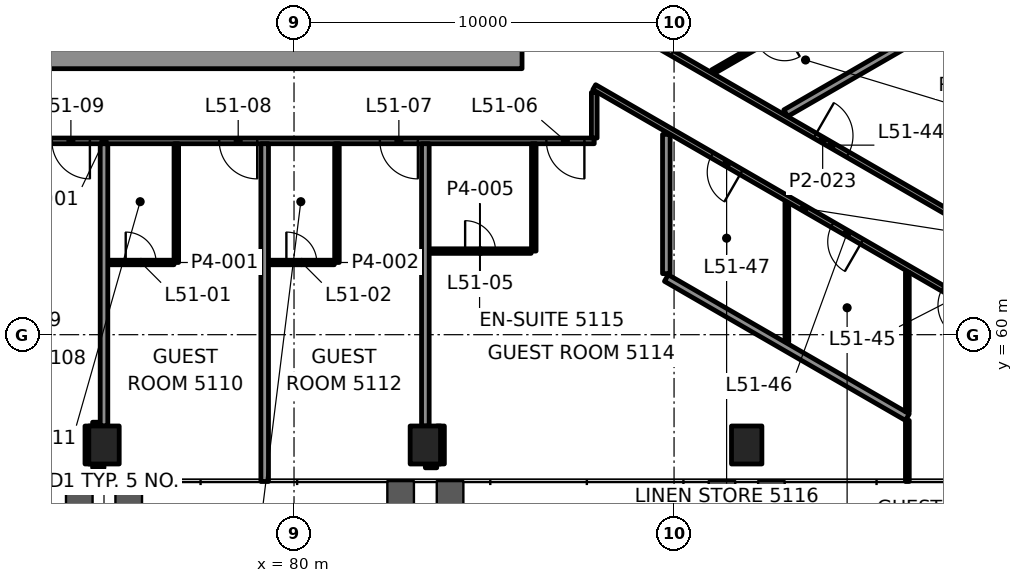
"""IFC4 building model, lengths in metres.
Left out: names, types, materials, properties, quantities, classifications, styles, units other than length and angle.
Written with IfcOpenShell. Run it as: python <this file> out.ifc"""

import sys

from ifc_helpers import new_model, si_unit, direction, frame, frame_2d, origin, origin_2d, place, context, subcontext, project, spatial, rectangle, hollow_rectangle, extrude, element, fill, save


model = new_model("IFC4")
c1 = context("Model", 3, precision=1e-05, world=origin(), true_north=direction((0.0, 1.0)))
c2 = subcontext(c1, "Body", "Model", "MODEL_VIEW")
j1 = project(units=[si_unit("LENGTHUNIT", "METRE"), si_unit("PLANEANGLEUNIT", "RADIAN")], contexts=[c1])
p1 = place(None, origin())
s1 = spatial("IfcSite", under=j1, at=p1, CompositionType="ELEMENT")
p2 = place(p1, origin())
s2 = spatial("IfcBuilding", under=s1, at=p2, CompositionType="ELEMENT")
p3 = place(p2, frame((0.0, 0.0, 218.2)))
s3 = spatial("IfcBuildingStorey", under=s2, at=p3, CompositionType="ELEMENT", Elevation=218.2)
for number, where, z_axis, x_axis in (
    (1, (75.0, 57.097, -0.0), (0.0, 0.0, 1.0), (1.0, 0.0, 0.0)),
    (2, (83.456, 57.097, -0.0), (0.0, 0.0, 1.0), (1.0, 0.0, 0.0)),
    (3, (91.911, 57.097, -0.0), (0.0, 0.0, 1.0), (1.0, 0.0, 0.0)),
):
    element("IfcColumn", number, at=place(p3, frame(where, z_axis=z_axis, x_axis=x_axis)), inside=s3, PredefinedType="COLUMN", context=c2, shape_type="SweptSolid", body=[
        extrude(hollow_rectangle(XDim=0.8, YDim=1.0, WallThickness=0.05, at=origin_2d()), origin(), (0.0, 0.0, 1.0), 3.9),
    ])
p4 = place(p3, frame((64.0, 67.375, 0.0), z_axis=(0.0, 0.0, 1.0), x_axis=(1.0, 0.0, 0.0)))
e4 = element("IfcWall", 4, at=p4, inside=s3, PredefinedType="SHEAR", context=c2, shape_type="SweptSolid", body=[
    extrude(rectangle(XDim=22.0, YDim=0.75, at=frame_2d((11.0, 0.0))), origin(), (0.0, 0.0, 1.0), 3.7),
])
p5 = place(p4, frame((3.15, 0.0, 0.0)))
e5 = element("IfcOpeningElement", 5, at=p5, cuts=e4, PredefinedType="OPENING", context=c2, shape_type="SweptSolid", body=[
    extrude(rectangle(XDim=0.9, YDim=2.1, at=frame_2d((0.45, 1.05))), frame((0.0, 0.385, 0.0), z_axis=(0.0, -1.0, 0.0), x_axis=(1.0, 0.0, 0.0)), (0.0, 0.0, 1.0), 0.77),
])
p6 = place(p3, frame((74.7, 56.597, 0.0), z_axis=(0.0, 0.0, 1.0), x_axis=(1.0, 0.0, 0.0)))
e6 = element("IfcWall", 6, at=p6, inside=s3, PredefinedType="PARTITIONING", context=c2, shape_type="SweptSolid", body=[
    extrude(rectangle(XDim=0.299, YDim=0.2, at=frame_2d((0.149, 0.0))), origin(), (0.0, 0.0, 1.0), 3.1),
])
p7 = place(p3, frame((83.456, 56.597, 0.0), z_axis=(0.0, 0.0, 1.0), x_axis=(1.0, 0.0, 0.0)))
e7 = element("IfcWall", 7, at=p7, inside=s3, PredefinedType="PARTITIONING", context=c2, shape_type="SweptSolid", body=[
    extrude(rectangle(XDim=0.3, YDim=0.2, at=frame_2d((0.15, 0.0))), origin(), (0.0, 0.0, 1.0), 3.1),
])
p8 = place(p3, frame((74.7, 57.597, 0.0), z_axis=(0.0, 0.0, 1.0), x_axis=(1.0, 0.0, 0.0)))
e8 = element("IfcWall", 8, at=p8, inside=s3, PredefinedType="PARTITIONING", context=c2, shape_type="SweptSolid", body=[
    extrude(rectangle(XDim=0.199, YDim=0.2, at=frame_2d((0.1, 0.0))), origin(), (0.0, 0.0, 1.0), 3.1),
])
p9 = place(p3, frame((75.1, 61.9, 0.0), z_axis=(0.0, 0.0, 1.0), x_axis=(1.0, 0.0, 0.0)))
e9 = element("IfcWall", 9, at=p9, inside=s3, PredefinedType="PARTITIONING", context=c2, shape_type="SweptSolid", body=[
    extrude(rectangle(XDim=1.742, YDim=0.12, at=frame_2d((0.871, 0.0))), origin(), (0.0, 0.0, 1.0), 3.1),
])
p10 = place(p9, frame((0.471, 0.0, 0.0)))
e10 = element("IfcOpeningElement", 10, at=p10, cuts=e9, PredefinedType="OPENING", context=c2, shape_type="SweptSolid", body=[
    extrude(rectangle(XDim=0.8, YDim=2.1, at=frame_2d((0.4, 1.05))), frame((0.0, 0.07, 0.0), z_axis=(0.0, -1.0, 0.0), x_axis=(1.0, 0.0, 0.0)), (0.0, 0.0, 1.0), 0.14),
])
p11 = place(p3, frame((79.338, 61.9, 0.0), z_axis=(0.0, 0.0, 1.0), x_axis=(1.0, 0.0, 0.0)))
e11 = element("IfcWall", 11, at=p11, inside=s3, PredefinedType="PARTITIONING", context=c2, shape_type="SweptSolid", body=[
    extrude(rectangle(XDim=1.722, YDim=0.12, at=frame_2d((0.861, 0.0))), origin(), (0.0, 0.0, 1.0), 3.1),
])
p12 = place(p11, frame((0.461, 0.0, 0.0)))
e12 = element("IfcOpeningElement", 12, at=p12, cuts=e11, PredefinedType="OPENING", context=c2, shape_type="SweptSolid", body=[
    extrude(rectangle(XDim=0.8, YDim=2.1, at=frame_2d((0.4, 1.05))), frame((0.0, 0.07, 0.0), z_axis=(0.0, -1.0, 0.0), x_axis=(1.0, 0.0, 0.0)), (0.0, 0.0, 1.0), 0.14),
])
p13 = place(p3, frame((83.566, 62.2, 0.0), z_axis=(0.0, 0.0, 1.0), x_axis=(1.0, 0.0, 0.0)))
e13 = element("IfcWall", 13, at=p13, inside=s3, PredefinedType="PARTITIONING", context=c2, shape_type="SweptSolid", body=[
    extrude(rectangle(XDim=2.674, YDim=0.12, at=frame_2d((1.337, 0.0))), origin(), (0.0, 0.0, 1.0), 3.1),
])
p14 = place(p13, frame((0.937, 0.0, 0.0)))
e14 = element("IfcOpeningElement", 14, at=p14, cuts=e13, PredefinedType="OPENING", context=c2, shape_type="SweptSolid", body=[
    extrude(rectangle(XDim=0.8, YDim=2.1, at=frame_2d((0.4, 1.05))), frame((0.0, 0.07, 0.0), z_axis=(0.0, -1.0, 0.0), x_axis=(1.0, 0.0, 0.0)), (0.0, 0.0, 1.0), 0.14),
])
p15 = place(p3, frame((87.899, 65.1, 0.0), z_axis=(0.0, 0.0, 1.0), x_axis=(-1.0, 0.0, 0.0)))
e15 = element("IfcWall", 15, at=p15, inside=s3, PredefinedType="PARTITIONING", context=c2, shape_type="SweptSolid", body=[
    extrude(rectangle(XDim=25.799, YDim=0.15, at=frame_2d((12.899, 0.0))), origin(), (0.0, 0.0, 1.0), 3.1),
])
p16 = place(p15, frame((0.259, 0.0, 0.0)))
e16 = element("IfcOpeningElement", 16, at=p16, cuts=e15, PredefinedType="OPENING", context=c2, shape_type="SweptSolid", body=[
    extrude(rectangle(XDim=1.0, YDim=2.1, at=frame_2d((0.5, 1.05))), frame((0.0, 0.085, 0.0), z_axis=(0.0, -1.0, 0.0), x_axis=(1.0, 0.0, 0.0)), (0.0, 0.0, 1.0), 0.17),
])
p17 = place(p15, frame((4.641, 0.0, 0.0)))
e17 = element("IfcOpeningElement", 17, at=p17, cuts=e15, PredefinedType="OPENING", context=c2, shape_type="SweptSolid", body=[
    extrude(rectangle(XDim=1.0, YDim=2.1, at=frame_2d((0.5, 1.05))), frame((0.0, 0.085, 0.0), z_axis=(0.0, -1.0, 0.0), x_axis=(1.0, 0.0, 0.0)), (0.0, 0.0, 1.0), 0.17),
])
p18 = place(p15, frame((8.868, 0.0, 0.0)))
e18 = element("IfcOpeningElement", 18, at=p18, cuts=e15, PredefinedType="OPENING", context=c2, shape_type="SweptSolid", body=[
    extrude(rectangle(XDim=1.0, YDim=2.1, at=frame_2d((0.5, 1.05))), frame((0.0, 0.085, 0.0), z_axis=(0.0, -1.0, 0.0), x_axis=(1.0, 0.0, 0.0)), (0.0, 0.0, 1.0), 0.17),
])
p19 = place(p15, frame((13.271, 0.0, 0.0)))
e19 = element("IfcOpeningElement", 19, at=p19, cuts=e15, PredefinedType="OPENING", context=c2, shape_type="SweptSolid", body=[
    extrude(rectangle(XDim=1.0, YDim=2.1, at=frame_2d((0.5, 1.05))), frame((0.0, 0.085, 0.0), z_axis=(0.0, -1.0, 0.0), x_axis=(1.0, 0.0, 0.0)), (0.0, 0.0, 1.0), 0.17),
])
p20 = place(p15, frame((19.612, 0.0, 0.0)))
e20 = element("IfcOpeningElement", 20, at=p20, cuts=e15, PredefinedType="OPENING", context=c2, shape_type="SweptSolid", body=[
    extrude(rectangle(XDim=1.0, YDim=2.1, at=frame_2d((0.5, 1.05))), frame((0.0, 0.085, 0.0), z_axis=(0.0, -1.0, 0.0), x_axis=(1.0, 0.0, 0.0)), (0.0, 0.0, 1.0), 0.17),
])
p21 = place(p3, frame((92.938, 65.83, 0.0), z_axis=(0.0, 0.0, 1.0), x_axis=(0.866041300655, 0.499972464802, 0.0)))
e21 = element("IfcWall", 21, at=p21, inside=s3, PredefinedType="PARTITIONING", context=c2, shape_type="SweptSolid", body=[
    extrude(rectangle(XDim=6.452, YDim=0.2, at=frame_2d((3.226, 0.0))), origin(), (0.0, 0.0, 1.0), 3.1),
])
p22 = place(p3, frame((94.109, 68.702, 0.0), z_axis=(0.0, 0.0, 1.0), x_axis=(-0.866028357664, -0.499994883695, 0.0)))
e22 = element("IfcWall", 22, at=p22, inside=s3, PredefinedType="PARTITIONING", context=c2, shape_type="SweptSolid", body=[
    extrude(rectangle(XDim=3.568, YDim=0.12, at=frame_2d((1.784, 0.0))), origin(), (0.0, 0.0, 1.0), 3.1),
])
p23 = place(p22, frame((1.384, 0.0, 0.0)))
e23 = element("IfcOpeningElement", 23, at=p23, cuts=e22, PredefinedType="OPENING", context=c2, shape_type="SweptSolid", body=[
    extrude(rectangle(XDim=0.8, YDim=2.1, at=frame_2d((0.4, 1.05))), frame((0.0, 0.07, 0.0), z_axis=(0.0, -1.0, 0.0), x_axis=(1.0, 0.0, 0.0)), (0.0, 0.0, 1.0), 0.14),
])
p24 = place(p3, frame((96.139, 56.137, 0.0), z_axis=(0.0, 0.0, 1.0), x_axis=(0.0, 1.0, 0.0)))
e24 = element("IfcWall", 24, at=p24, inside=s3, PredefinedType="PARTITIONING", context=c2, shape_type="SweptSolid", body=[
    extrude(rectangle(XDim=1.606, YDim=0.1, at=frame_2d((0.803, 0.0))), origin(), (0.0, 0.0, 1.0), 3.1),
])
p25 = place(p3, frame((92.968, 59.806, 0.0), z_axis=(0.0, 0.0, 1.0), x_axis=(0.0, 1.0, 0.0)))
e25 = element("IfcWall", 25, at=p25, inside=s3, PredefinedType="PARTITIONING", context=c2, shape_type="SweptSolid", body=[
    extrude(rectangle(XDim=3.664, YDim=0.1, at=frame_2d((1.832, 0.0))), origin(), (0.0, 0.0, 1.0), 3.1),
])
p26 = place(p3, frame((89.797, 61.607, 0.0), z_axis=(0.0, 0.0, 1.0), x_axis=(0.0, 1.0, 0.0)))
e26 = element("IfcWall", 26, at=p26, inside=s3, PredefinedType="PARTITIONING", context=c2, shape_type="SweptSolid", body=[
    extrude(rectangle(XDim=3.664, YDim=0.2, at=frame_2d((1.832, 0.0))), origin(), (0.0, 0.0, 1.0), 2.947),
])
p27 = place(p3, frame((87.9, 65.176, 0.0), z_axis=(0.0, 0.0, 1.0), x_axis=(0.0, 1.0, 0.0)))
e27 = element("IfcWall", 27, at=p27, inside=s3, PredefinedType="PARTITIONING", context=c2, shape_type="SweptSolid", body=[
    extrude(rectangle(XDim=1.201, YDim=0.15, at=frame_2d((0.6, 0.0))), origin(), (0.0, 0.0, 1.0), 2.947),
])
p28 = place(p3, frame((86.309, 62.2, 0.0), z_axis=(0.0, 0.0, 1.0), x_axis=(0.0, 1.0, 0.0)))
e28 = element("IfcWall", 28, at=p28, inside=s3, PredefinedType="PARTITIONING", context=c2, shape_type="SweptSolid", body=[
    extrude(rectangle(XDim=2.825, YDim=0.12, at=frame_2d((1.413, 0.0))), origin(), (0.0, 0.0, 1.0), 3.1),
])
p29 = place(p3, frame((83.856, 56.598, 0.0), z_axis=(0.0, 0.0, 1.0), x_axis=(0.0, 1.0, 0.0)))
e29 = element("IfcWall", 29, at=p29, inside=s3, PredefinedType="PARTITIONING", context=c2, shape_type="SweptSolid", body=[
    extrude(rectangle(XDim=0.999, YDim=0.2, at=frame_2d((0.5, 0.0))), origin(), (0.0, 0.0, 1.0), 3.022),
])
p30 = place(p3, frame((83.456, 57.597, 0.0), z_axis=(0.0, 0.0, 1.0), x_axis=(0.0, 1.0, 0.0)))
e30 = element("IfcWall", 30, at=p30, inside=s3, PredefinedType="PARTITIONING", context=c2, shape_type="SweptSolid", body=[
    extrude(rectangle(XDim=7.427, YDim=0.2, at=frame_2d((3.714, 0.0))), origin(), (0.0, 0.0, 1.0), 3.1),
])
p31 = place(p3, frame((81.13, 61.9, 0.0), z_axis=(0.0, 0.0, 1.0), x_axis=(0.0, 1.0, 0.0)))
e31 = element("IfcWall", 31, at=p31, inside=s3, PredefinedType="PARTITIONING", context=c2, shape_type="SweptSolid", body=[
    extrude(rectangle(XDim=3.125, YDim=0.12, at=frame_2d((1.562, 0.0))), origin(), (0.0, 0.0, 1.0), 3.1),
])
p32 = place(p3, frame((79.228, 56.137, 0.0), z_axis=(0.0, 0.0, 1.0), x_axis=(0.0, 1.0, 0.0)))
e32 = element("IfcWall", 32, at=p32, inside=s3, PredefinedType="PARTITIONING", context=c2, shape_type="SweptSolid", body=[
    extrude(rectangle(XDim=8.887, YDim=0.2, at=frame_2d((4.444, 0.0))), origin(), (0.0, 0.0, 1.0), 3.022),
])
p33 = place(p3, frame((76.903, 61.9, 0.0), z_axis=(0.0, 0.0, 1.0), x_axis=(0.0, 1.0, 0.0)))
e33 = element("IfcWall", 33, at=p33, inside=s3, PredefinedType="PARTITIONING", context=c2, shape_type="SweptSolid", body=[
    extrude(rectangle(XDim=3.125, YDim=0.12, at=frame_2d((1.562, 0.0))), origin(), (0.0, 0.0, 1.0), 3.1),
])
p34 = place(p3, frame((75.0, 57.598, 0.0), z_axis=(0.0, 0.0, 1.0), x_axis=(0.0, 1.0, 0.0)))
e34 = element("IfcWall", 34, at=p34, inside=s3, PredefinedType="PARTITIONING", context=c2, shape_type="SweptSolid", body=[
    extrude(rectangle(XDim=7.427, YDim=0.2, at=frame_2d((3.713, 0.0))), origin(), (0.0, 0.0, 1.0), 3.1),
])
p35 = place(p3, frame((74.6, 56.598, 0.0), z_axis=(0.0, 0.0, 1.0), x_axis=(0.0, 1.0, 0.0)))
e35 = element("IfcWall", 35, at=p35, inside=s3, PredefinedType="PARTITIONING", context=c2, shape_type="SweptSolid", body=[
    extrude(rectangle(XDim=0.999, YDim=0.2, at=frame_2d((0.5, 0.0))), origin(), (0.0, 0.0, 1.0), 3.022),
])
p36 = place(p3, frame((87.975, 68.548, 0.0), z_axis=(0.0, 0.0, 1.0), x_axis=(0.866024823711, -0.500001004715, 0.0)))
e36 = element("IfcWall", 36, at=p36, inside=s3, PredefinedType="PARTITIONING", context=c2, shape_type="SweptSolid", body=[
    extrude(rectangle(XDim=13.707, YDim=0.15, at=frame_2d((6.854, 0.0))), origin(), (0.0, 0.0, 1.0), 3.1),
])
p37 = place(p36, frame((1.283, 0.0, 0.0)))
e37 = element("IfcOpeningElement", 37, at=p37, cuts=e36, PredefinedType="OPENING", context=c2, shape_type="SweptSolid", body=[
    extrude(rectangle(XDim=1.0, YDim=2.1, at=frame_2d((0.5, 1.05))), frame((0.0, 0.085, 0.0), z_axis=(0.0, -1.0, 0.0), x_axis=(1.0, 0.0, 0.0)), (0.0, 0.0, 1.0), 0.17),
])
p38 = place(p36, frame((6.62, 0.0, 0.0)))
e38 = element("IfcOpeningElement", 38, at=p38, cuts=e36, PredefinedType="OPENING", context=c2, shape_type="SweptSolid", body=[
    extrude(rectangle(XDim=1.0, YDim=2.1, at=frame_2d((0.5, 1.05))), frame((0.0, 0.085, 0.0), z_axis=(0.0, -1.0, 0.0), x_axis=(1.0, 0.0, 0.0)), (0.0, 0.0, 1.0), 0.17),
])
p39 = place(p3, frame((98.945, 60.136, 0.0), z_axis=(0.0, 0.0, 1.0), x_axis=(-0.866024604137, 0.500001385028, 0.0)))
e39 = element("IfcWall", 39, at=p39, inside=s3, PredefinedType="PARTITIONING", context=c2, shape_type="SweptSolid", body=[
    extrude(rectangle(XDim=12.754, YDim=0.15, at=frame_2d((6.377, 0.0))), origin(), (0.0, 0.0, 1.0), 2.947),
])
p40 = place(p39, frame((1.271, 0.0, 0.0)))
e40 = element("IfcOpeningElement", 40, at=p40, cuts=e39, PredefinedType="OPENING", context=c2, shape_type="SweptSolid", body=[
    extrude(rectangle(XDim=0.9, YDim=2.1, at=frame_2d((0.45, 1.05))), frame((0.0, 0.085, 0.0), z_axis=(0.0, -1.0, 0.0), x_axis=(1.0, 0.0, 0.0)), (0.0, 0.0, 1.0), 0.17),
])
p41 = place(p39, frame((4.621, 0.0, 0.0)))
e41 = element("IfcOpeningElement", 41, at=p41, cuts=e39, PredefinedType="OPENING", context=c2, shape_type="SweptSolid", body=[
    extrude(rectangle(XDim=0.9, YDim=2.1, at=frame_2d((0.45, 1.05))), frame((0.0, 0.085, 0.0), z_axis=(0.0, -1.0, 0.0), x_axis=(1.0, 0.0, 0.0)), (0.0, 0.0, 1.0), 0.17),
])
p42 = place(p39, frame((8.282, 0.0, 0.0)))
e42 = element("IfcOpeningElement", 42, at=p42, cuts=e39, PredefinedType="OPENING", context=c2, shape_type="SweptSolid", body=[
    extrude(rectangle(XDim=0.9, YDim=2.1, at=frame_2d((0.45, 1.05))), frame((0.0, 0.085, 0.0), z_axis=(0.0, -1.0, 0.0), x_axis=(1.0, 0.0, 0.0)), (0.0, 0.0, 1.0), 0.17),
])
p43 = place(p3, frame((96.139, 57.83, 0.0), z_axis=(0.0, 0.0, 1.0), x_axis=(-0.866014584968, 0.500018738272, 0.0)))
e43 = element("IfcWall", 43, at=p43, inside=s3, PredefinedType="PARTITIONING", context=c2, shape_type="SweptSolid", body=[
    extrude(rectangle(XDim=7.323, YDim=0.2, at=frame_2d((3.662, 0.0))), origin(), (0.0, 0.0, 1.0), 3.1),
])
p44 = place(p3, frame((96.139, 57.975, 0.0), z_axis=(0.0, 0.0, 1.0), x_axis=(0.0, 1.0, 0.0)))
e44 = element("IfcWall", 44, at=p44, inside=s3, PredefinedType="PARTITIONING", context=c2, shape_type="SweptSolid", body=[
    extrude(rectangle(XDim=3.665, YDim=0.1, at=frame_2d((1.833, 0.0))), origin(), (0.0, 0.0, 1.0), 3.1),
])
p45 = place(p10, origin())
e45 = element("IfcDoor", 45, at=p45, inside=s3, OperationType="SINGLE_SWING_RIGHT", PredefinedType="DOOR", context=c2, shape_type="SweptSolid", body=[
    extrude(rectangle(XDim=0.8, YDim=2.1, at=frame_2d((0.4, 1.05))), frame((0.0, 0.025, 0.0), z_axis=(0.0, -1.0, 0.0), x_axis=(1.0, 0.0, 0.0)), (0.0, 0.0, 1.0), 0.05),
])
fill(e10, e45)
p46 = place(p12, origin())
e46 = element("IfcDoor", 46, at=p46, inside=s3, OperationType="SINGLE_SWING_RIGHT", PredefinedType="DOOR", context=c2, shape_type="SweptSolid", body=[
    extrude(rectangle(XDim=0.8, YDim=2.1, at=frame_2d((0.4, 1.05))), frame((0.0, 0.025, 0.0), z_axis=(0.0, -1.0, 0.0), x_axis=(1.0, 0.0, 0.0)), (0.0, 0.0, 1.0), 0.05),
])
fill(e12, e46)
p47 = place(p14, origin())
e47 = element("IfcDoor", 47, at=p47, inside=s3, OperationType="SINGLE_SWING_RIGHT", PredefinedType="DOOR", context=c2, shape_type="SweptSolid", body=[
    extrude(rectangle(XDim=0.8, YDim=2.1, at=frame_2d((0.4, 1.05))), frame((0.0, 0.025, 0.0), z_axis=(0.0, -1.0, 0.0), x_axis=(1.0, 0.0, 0.0)), (0.0, 0.0, 1.0), 0.05),
])
fill(e14, e47)
p48 = place(p16, origin())
e48 = element("IfcDoor", 48, at=p48, inside=s3, OperationType="SINGLE_SWING_RIGHT", PredefinedType="DOOR", context=c2, shape_type="SweptSolid", body=[
    extrude(rectangle(XDim=1.0, YDim=2.1, at=frame_2d((0.5, 1.05))), frame((0.0, 0.025, 0.0), z_axis=(0.0, -1.0, 0.0), x_axis=(1.0, 0.0, 0.0)), (0.0, 0.0, 1.0), 0.05),
])
fill(e16, e48)
p49 = place(p17, origin())
e49 = element("IfcDoor", 49, at=p49, inside=s3, OperationType="SINGLE_SWING_RIGHT", PredefinedType="DOOR", context=c2, shape_type="SweptSolid", body=[
    extrude(rectangle(XDim=1.0, YDim=2.1, at=frame_2d((0.5, 1.05))), frame((0.0, 0.025, 0.0), z_axis=(0.0, -1.0, 0.0), x_axis=(1.0, 0.0, 0.0)), (0.0, 0.0, 1.0), 0.05),
])
fill(e17, e49)
p50 = place(p18, origin())
e50 = element("IfcDoor", 50, at=p50, inside=s3, OperationType="SINGLE_SWING_RIGHT", PredefinedType="DOOR", context=c2, shape_type="SweptSolid", body=[
    extrude(rectangle(XDim=1.0, YDim=2.1, at=frame_2d((0.5, 1.05))), frame((0.0, 0.025, 0.0), z_axis=(0.0, -1.0, 0.0), x_axis=(1.0, 0.0, 0.0)), (0.0, 0.0, 1.0), 0.05),
])
fill(e18, e50)
p51 = place(p19, origin())
e51 = element("IfcDoor", 51, at=p51, inside=s3, OperationType="SINGLE_SWING_RIGHT", PredefinedType="DOOR", context=c2, shape_type="SweptSolid", body=[
    extrude(rectangle(XDim=1.0, YDim=2.1, at=frame_2d((0.5, 1.05))), frame((0.0, 0.025, 0.0), z_axis=(0.0, -1.0, 0.0), x_axis=(1.0, 0.0, 0.0)), (0.0, 0.0, 1.0), 0.05),
])
fill(e19, e51)
p52 = place(p37, origin())
e52 = element("IfcDoor", 52, at=p52, inside=s3, OperationType="SINGLE_SWING_LEFT", PredefinedType="DOOR", context=c2, shape_type="SweptSolid", body=[
    extrude(rectangle(XDim=1.0, YDim=2.1, at=frame_2d((0.5, 1.05))), frame((0.0, 0.025, 0.0), z_axis=(0.0, -1.0, 0.0), x_axis=(1.0, 0.0, 0.0)), (0.0, 0.0, 1.0), 0.05),
])
fill(e37, e52)
p53 = place(p38, origin())
e53 = element("IfcDoor", 53, at=p53, inside=s3, OperationType="SINGLE_SWING_LEFT", PredefinedType="DOOR", context=c2, shape_type="SweptSolid", body=[
    extrude(rectangle(XDim=1.0, YDim=2.1, at=frame_2d((0.5, 1.05))), frame((0.0, 0.025, 0.0), z_axis=(0.0, -1.0, 0.0), x_axis=(1.0, 0.0, 0.0)), (0.0, 0.0, 1.0), 0.05),
])
fill(e38, e53)
p54 = place(p40, origin())
e54 = element("IfcDoor", 54, at=p54, inside=s3, OperationType="SINGLE_SWING_LEFT", PredefinedType="DOOR", context=c2, shape_type="SweptSolid", body=[
    extrude(rectangle(XDim=0.9, YDim=2.1, at=frame_2d((0.45, 1.05))), frame((0.0, 0.025, 0.0), z_axis=(0.0, -1.0, 0.0), x_axis=(1.0, 0.0, 0.0)), (0.0, 0.0, 1.0), 0.05),
])
fill(e40, e54)
p55 = place(p41, origin())
e55 = element("IfcDoor", 55, at=p55, inside=s3, OperationType="SINGLE_SWING_RIGHT", PredefinedType="DOOR", context=c2, shape_type="SweptSolid", body=[
    extrude(rectangle(XDim=0.9, YDim=2.1, at=frame_2d((0.45, 1.05))), frame((0.0, 0.025, 0.0), z_axis=(0.0, -1.0, 0.0), x_axis=(1.0, 0.0, 0.0)), (0.0, 0.0, 1.0), 0.05),
])
fill(e41, e55)
p56 = place(p42, origin())
e56 = element("IfcDoor", 56, at=p56, inside=s3, OperationType="SINGLE_SWING_LEFT", PredefinedType="DOOR", context=c2, shape_type="SweptSolid", body=[
    extrude(rectangle(XDim=0.9, YDim=2.1, at=frame_2d((0.45, 1.05))), frame((0.0, 0.025, 0.0), z_axis=(0.0, -1.0, 0.0), x_axis=(1.0, 0.0, 0.0)), (0.0, 0.0, 1.0), 0.05),
])
fill(e42, e56)
save(model, sys.argv[1])
